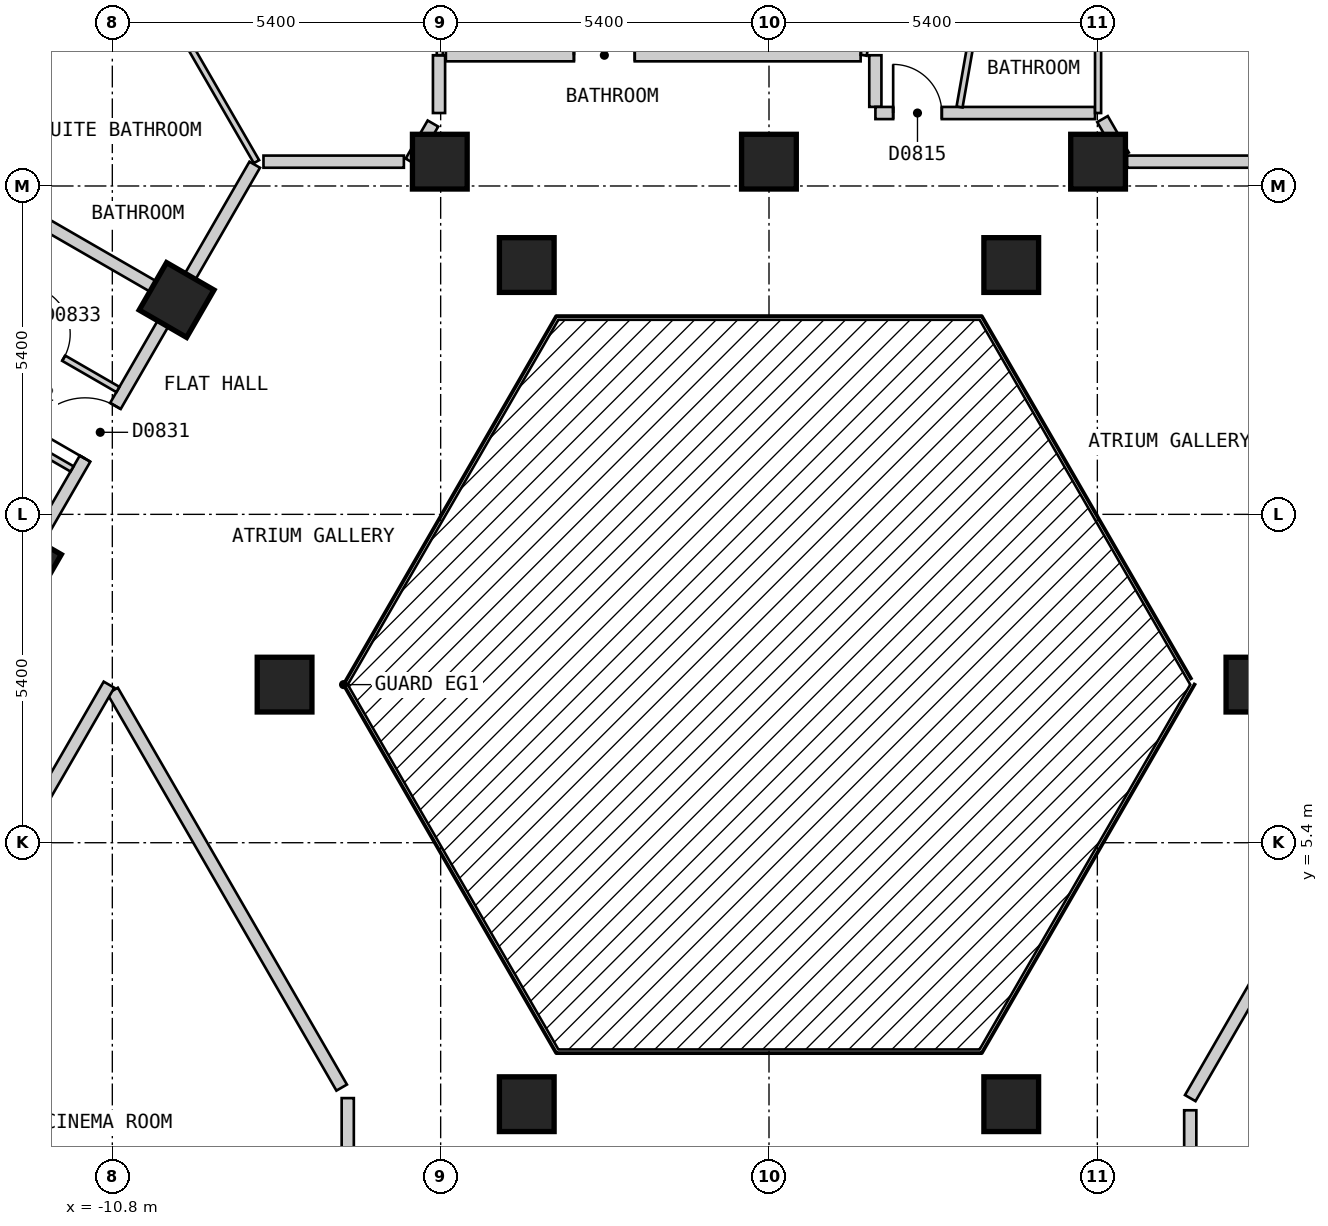
"""IFC4 building model, lengths in metres.
Left out: names, types, materials, properties, quantities, classifications, styles, units other than length and angle.
Written with IfcOpenShell. Run it as: python <this file> out.ifc"""

import sys

from ifc_helpers import new_model, si_unit, direction, frame, frame_2d, origin, origin_2d, place, context, subcontext, project, spatial, rectangle, extrude, element, fill, save


model = new_model("IFC4")
c1 = context("Model", 3, precision=1e-05, world=origin(), true_north=direction((0.0, 1.0)))
c2 = subcontext(c1, "Body", "Model", "MODEL_VIEW")
j1 = project(units=[si_unit("LENGTHUNIT", "METRE"), si_unit("PLANEANGLEUNIT", "RADIAN")], contexts=[c1])
p1 = place(None, origin())
s1 = spatial("IfcSite", under=j1, at=p1, CompositionType="ELEMENT")
p2 = place(p1, origin())
s2 = spatial("IfcBuilding", under=s1, at=p2, CompositionType="ELEMENT")
p3 = place(p2, frame((0.0, 0.0, 72.0)))
s3 = spatial("IfcBuildingStorey", under=s2, at=p3, CompositionType="ELEMENT", Elevation=72.0)
for number, where, z_axis, x_axis in (
    (1, (3.984, 1.1, 0.0), (0.0, 0.0, 1.0), (1.0, 0.0, 0.0)),
    (2, (7.967, 8.0, 0.0), (0.0, 0.0, 1.0), (1.0, 0.0, 0.0)),
    (3, (5.412, 16.6, 0.0), (0.0, 0.0, 1.0), (-1.0, 0.0, 0.0)),
    (4, (3.984, 14.9, 0.0), (0.0, 0.0, 1.0), (1.0, 0.0, 0.0)),
    (5, (-0.001, 16.6, 0.0), (0.0, 0.0, 1.0), (-1.0, 0.0, 0.0)),
    (6, (-3.984, 14.9, 0.0), (0.0, 0.0, 1.0), (1.0, 0.0, 0.0)),
    (7, (-5.414, 16.6, 0.0), (0.0, 0.0, 1.0), (-1.0, 0.0, 0.0)),
    (8, (-9.743, 14.325, 0.0), (0.0, 0.0, 1.0), (-0.5, -0.866, 0.0)),
    (9, (-7.967, 8.0, 0.0), (0.0, 0.0, 1.0), (1.0, 0.0, 0.0)),
    (10, (-12.254, 9.975, 0.0), (0.0, 0.0, 1.0), (-0.5, -0.866, 0.0)),
    (11, (-3.984, 1.1, 0.0), (0.0, 0.0, 1.0), (1.0, 0.0, 0.0)),
):
    element("IfcColumn", number, at=place(p3, frame(where, z_axis=z_axis, x_axis=x_axis)), inside=s3, PredefinedType="COLUMN", context=c2, shape_type="SweptSolid", body=[
        extrude(rectangle(XDim=0.9, YDim=0.9, at=origin_2d()), origin(), (0.0, 0.0, 1.0), 3.0),
    ])
p4 = place(p3, frame((-10.796, 7.899, 0.0), z_axis=(0.0, 0.0, 1.0), x_axis=(0.500010383074, -0.866019409031, 0.0)))
e12 = element("IfcWall", 12, at=p4, inside=s3, PredefinedType="PARTITIONING", context=c2, shape_type="SweptSolid", body=[
    extrude(rectangle(XDim=7.535, YDim=0.2, at=frame_2d((3.768, 0.0))), origin(), (0.0, 0.0, 1.0), 2.7),
])
p5 = place(p3, frame((5.485, 17.3, 0.0), z_axis=(0.0, 0.0, 1.0), x_axis=(0.499437640892, -0.866349838611, 0.0)))
e13 = element("IfcWall", 13, at=p5, inside=s3, PredefinedType="PARTITIONING", context=c2, shape_type="SweptSolid", body=[
    extrude(rectangle(XDim=0.693, YDim=0.2, at=frame_2d((0.346, 0.0))), origin(), (0.0, 0.0, 1.0), 2.7),
])
p6 = place(p3, frame((6.928, 1.0, 0.0), z_axis=(0.0, 0.0, 1.0), x_axis=(0.0, -1.0, 0.0)))
e14 = element("IfcWall", 14, at=p6, inside=s3, PredefinedType="PARTITIONING", context=c2, shape_type="SweptSolid", body=[
    extrude(rectangle(XDim=3.699, YDim=0.2, at=frame_2d((1.85, 0.0))), origin(), (0.0, 0.0, 1.0), 2.7),
])
p7 = place(p3, frame((1.749, 18.35, 0.0), z_axis=(0.0, 0.0, 1.0), x_axis=(0.0, -1.0, 0.0)))
e15 = element("IfcWall", 15, at=p7, inside=s3, PredefinedType="PARTITIONING", context=c2, shape_type="SweptSolid", body=[
    extrude(rectangle(XDim=0.849, YDim=0.2, at=frame_2d((0.425, 0.0))), origin(), (0.0, 0.0, 1.0), 2.7),
])
p8 = place(p3, frame((-8.314, 16.6, 0.0), z_axis=(0.0, 0.0, 1.0), x_axis=(1.0, 0.0, 0.0)))
e16 = element("IfcWall", 16, at=p8, inside=s3, PredefinedType="PARTITIONING", context=c2, shape_type="SweptSolid", body=[
    extrude(rectangle(XDim=2.309, YDim=0.2, at=frame_2d((1.155, 0.0))), origin(), (0.0, 0.0, 1.0), 2.7),
])
p9 = place(p3, frame((5.889, 16.6, 0.0), z_axis=(0.0, 0.0, 1.0), x_axis=(1.0, 0.0, 0.0)))
e17 = element("IfcWall", 17, at=p9, inside=s3, PredefinedType="PARTITIONING", context=c2, shape_type="SweptSolid", body=[
    extrude(rectangle(XDim=2.483, YDim=0.2, at=frame_2d((1.242, 0.0))), origin(), (0.0, 0.0, 1.0), 2.7),
])
p10 = place(p3, frame((1.75, 17.4, 0.0), z_axis=(0.0, 0.0, 1.0), x_axis=(1.0, 0.0, 0.0)))
e18 = element("IfcWall", 18, at=p10, inside=s3, PredefinedType="PARTITIONING", context=c2, shape_type="SweptSolid", body=[
    extrude(rectangle(XDim=3.612, YDim=0.2, at=frame_2d((1.806, 0.0))), origin(), (0.0, 0.0, 1.0), 2.7),
])
p11 = place(p10, frame((0.292, 0.0, 0.0)))
e19 = element("IfcOpeningElement", 19, at=p11, cuts=e18, PredefinedType="OPENING", context=c2, shape_type="SweptSolid", body=[
    extrude(rectangle(XDim=0.8, YDim=2.1, at=frame_2d((0.4, 1.05))), frame((0.0, 0.11, 0.0), z_axis=(0.0, -1.0, 0.0), x_axis=(1.0, 0.0, 0.0)), (0.0, 0.0, 1.0), 0.22),
])
p12 = place(p3, frame((-5.314, 18.35, 0.0), z_axis=(0.0, 0.0, 1.0), x_axis=(1.0, 0.0, 0.0)))
e20 = element("IfcWall", 20, at=p12, inside=s3, PredefinedType="PARTITIONING", context=c2, shape_type="SweptSolid", body=[
    extrude(rectangle(XDim=6.821, YDim=0.2, at=frame_2d((3.411, 0.0))), origin(), (0.0, 0.0, 1.0), 2.7),
])
p13 = place(p12, frame((2.106, 0.0, 0.0)))
e21 = element("IfcOpeningElement", 21, at=p13, cuts=e20, PredefinedType="OPENING", context=c2, shape_type="SweptSolid", body=[
    extrude(rectangle(XDim=1.0, YDim=2.1, at=frame_2d((0.5, 1.05))), frame((0.0, 0.11, 0.0), z_axis=(0.0, -1.0, 0.0), x_axis=(1.0, 0.0, 0.0)), (0.0, 0.0, 1.0), 0.22),
])
p14 = place(p3, frame((6.928, 1.2, 0.0), z_axis=(0.0, 0.0, 1.0), x_axis=(0.500055327065, 0.865993458332, 0.0)))
e22 = element("IfcWall", 22, at=p14, inside=s3, PredefinedType="PARTITIONING", context=c2, shape_type="SweptSolid", body=[
    extrude(rectangle(XDim=7.851, YDim=0.2, at=frame_2d((3.926, 0.0))), origin(), (0.0, 0.0, 1.0), 2.7),
])
p15 = place(p3, frame((-16.05, -1.0, 0.0), z_axis=(0.0, 0.0, 1.0), x_axis=(0.499962449088, 0.866047082728, 0.0)))
e23 = element("IfcWall", 23, at=p15, inside=s3, PredefinedType="PARTITIONING", context=c2, shape_type="SweptSolid", body=[
    extrude(rectangle(XDim=10.391, YDim=0.2, at=frame_2d((5.195, 0.0))), origin(), (0.0, 0.0, 1.0), 2.7),
])
p16 = place(p15, frame((4.745, 0.0, 0.0)))
e24 = element("IfcOpeningElement", 24, at=p16, cuts=e23, PredefinedType="OPENING", context=c2, shape_type="SweptSolid", body=[
    extrude(rectangle(XDim=0.9, YDim=2.1, at=frame_2d((0.45, 1.05))), frame((0.0, 0.11, 0.0), z_axis=(0.0, -1.0, 0.0), x_axis=(1.0, 0.0, 0.0)), (0.0, 0.0, 1.0), 0.22),
])
p17 = place(p3, frame((-5.889, 16.6, 0.0), z_axis=(0.0, 0.0, 1.0), x_axis=(0.499839240638, 0.866118198353, 0.0)))
e25 = element("IfcWall", 25, at=p17, inside=s3, PredefinedType="PARTITIONING", context=c2, shape_type="SweptSolid", body=[
    extrude(rectangle(XDim=0.724, YDim=0.2, at=frame_2d((0.362, 0.0))), origin(), (0.0, 0.0, 1.0), 2.7),
])
p18 = place(p3, frame((-18.562, -0.951, 0.0), z_axis=(0.0, 0.0, 1.0), x_axis=(0.499992962407, 0.866029466902, 0.0)))
e26 = element("IfcWall", 26, at=p18, inside=s3, PredefinedType="PARTITIONING", context=c2, shape_type="SweptSolid", body=[
    extrude(rectangle(XDim=20.208, YDim=0.2, at=frame_2d((10.104, 0.0))), origin(), (0.0, 0.0, 1.0), 2.7),
])
p19 = place(p18, frame((14.627, 0.0, 0.0)))
e27 = element("IfcOpeningElement", 27, at=p19, cuts=e26, PredefinedType="OPENING", context=c2, shape_type="SweptSolid", body=[
    extrude(rectangle(XDim=1.0, YDim=2.1, at=frame_2d((0.5, 1.05))), frame((0.0, 0.11, 0.0), z_axis=(0.0, -1.0, 0.0), x_axis=(1.0, 0.0, 0.0)), (0.0, 0.0, 1.0), 0.22),
])
p20 = place(p18, frame((4.581, 0.0, 0.0)))
e28 = element("IfcOpeningElement", 28, at=p20, cuts=e26, PredefinedType="OPENING", context=c2, shape_type="SweptSolid", body=[
    extrude(rectangle(XDim=1.0, YDim=2.1, at=frame_2d((0.5, 1.05))), frame((0.0, 0.11, 0.0), z_axis=(0.0, -1.0, 0.0), x_axis=(1.0, 0.0, 0.0)), (0.0, 0.0, 1.0), 0.22),
])
p21 = place(p3, frame((-5.427, 17.4, 0.0), z_axis=(0.0, 0.0, 1.0), x_axis=(0.0, 1.0, 0.0)))
e29 = element("IfcWall", 29, at=p21, inside=s3, PredefinedType="PARTITIONING", context=c2, shape_type="SweptSolid", body=[
    extrude(rectangle(XDim=0.95, YDim=0.2, at=frame_2d((0.475, 0.0))), origin(), (0.0, 0.0, 1.0), 2.7),
])
p22 = place(p3, frame((-6.928, -2.799, 0.0), z_axis=(0.0, 0.0, 1.0), x_axis=(0.0, 1.0, 0.0)))
e30 = element("IfcWall", 30, at=p22, inside=s3, PredefinedType="PARTITIONING", context=c2, shape_type="SweptSolid", body=[
    extrude(rectangle(XDim=3.999, YDim=0.2, at=frame_2d((2.0, 0.0))), origin(), (0.0, 0.0, 1.0), 2.7),
])
p23 = place(p3, frame((-10.742, 20.606, 0.0), z_axis=(0.0, 0.0, 1.0), x_axis=(0.50003312339, -0.866006279142, 0.0)))
e31 = element("IfcWall", 31, at=p23, inside=s3, PredefinedType="PARTITIONING", context=c2, shape_type="SweptSolid", body=[
    extrude(rectangle(XDim=4.626, YDim=0.1, at=frame_2d((2.313, 0.0))), origin(), (0.0, 0.0, 1.0), 2.7),
])
p24 = place(p3, frame((-13.981, 13.002, 0.0), z_axis=(0.0, 0.0, 1.0), x_axis=(0.86595634977, -0.500119585993, 0.0)))
e32 = element("IfcWall", 32, at=p24, inside=s3, PredefinedType="PARTITIONING", context=c2, shape_type="SweptSolid", body=[
    extrude(rectangle(XDim=2.909, YDim=0.1, at=frame_2d((1.455, 0.0))), origin(), (0.0, 0.0, 1.0), 2.7),
])
p25 = place(p24, frame((1.029, 0.0, 0.0)))
e33 = element("IfcOpeningElement", 33, at=p25, cuts=e32, PredefinedType="OPENING", context=c2, shape_type="SweptSolid", body=[
    extrude(rectangle(XDim=0.9, YDim=2.1, at=frame_2d((0.45, 1.05))), frame((0.0, 0.06, 0.0), z_axis=(0.0, -1.0, 0.0), x_axis=(1.0, 0.0, 0.0)), (0.0, 0.0, 1.0), 0.12),
])
p26 = place(p3, frame((-13.228, 14.308, 0.0), z_axis=(0.0, 0.0, 1.0), x_axis=(0.866003949776, -0.500037157592, 0.0)))
e34 = element("IfcWall", 34, at=p26, inside=s3, PredefinedType="PARTITIONING", context=c2, shape_type="SweptSolid", body=[
    extrude(rectangle(XDim=2.91, YDim=0.1, at=frame_2d((1.455, 0.0))), origin(), (0.0, 0.0, 1.0), 2.7),
])
p27 = place(p26, frame((1.08, 0.0, 0.0)))
e35 = element("IfcOpeningElement", 35, at=p27, cuts=e34, PredefinedType="OPENING", context=c2, shape_type="SweptSolid", body=[
    extrude(rectangle(XDim=0.8, YDim=2.1, at=frame_2d((0.4, 1.05))), frame((0.0, 0.06, 0.0), z_axis=(0.0, -1.0, 0.0), x_axis=(1.0, 0.0, 0.0)), (0.0, 0.0, 1.0), 0.12),
])
p28 = place(p3, frame((-13.328, 16.511, 0.0), z_axis=(0.0, 0.0, 1.0), x_axis=(0.518570528669, 0.855034857065, 0.0)))
e36 = element("IfcWall", 36, at=p28, inside=s3, PredefinedType="PARTITIONING", context=c2, shape_type="SweptSolid", body=[
    extrude(rectangle(XDim=4.83, YDim=0.1, at=frame_2d((2.415, 0.0))), origin(), (0.0, 0.0, 1.0), 2.7),
])
p29 = place(p28, frame((1.995, 0.0, 0.0)))
e37 = element("IfcOpeningElement", 37, at=p29, cuts=e36, PredefinedType="OPENING", context=c2, shape_type="SweptSolid", body=[
    extrude(rectangle(XDim=0.8, YDim=2.1, at=frame_2d((0.4, 1.05))), frame((0.0, 0.06, 0.0), z_axis=(0.0, -1.0, 0.0), x_axis=(1.0, 0.0, 0.0)), (0.0, 0.0, 1.0), 0.12),
])
p30 = place(p3, frame((3.134, 17.5, 0.0), z_axis=(0.0, 0.0, 1.0), x_axis=(0.172821216702, 0.984953210593, 0.0)))
e38 = element("IfcWall", 38, at=p30, inside=s3, PredefinedType="PARTITIONING", context=c2, shape_type="SweptSolid", body=[
    extrude(rectangle(XDim=4.97, YDim=0.1, at=frame_2d((2.485, 0.0))), origin(), (0.0, 0.0, 1.0), 2.7),
])
p31 = place(p30, frame((2.059, 0.0, 0.0)))
e39 = element("IfcOpeningElement", 39, at=p31, cuts=e38, PredefinedType="OPENING", context=c2, shape_type="SweptSolid", body=[
    extrude(rectangle(XDim=0.8, YDim=2.1, at=frame_2d((0.4, 1.05))), frame((0.0, 0.06, 0.0), z_axis=(0.0, -1.0, 0.0), x_axis=(1.0, 0.0, 0.0)), (0.0, 0.0, 1.0), 0.12),
])
p32 = place(p3, frame((1.557, 18.35, 0.0), z_axis=(0.0, 0.0, 1.0), x_axis=(0.173062973099, 0.984910761106, 0.0)))
e40 = element("IfcWall", 40, at=p32, inside=s3, PredefinedType="PARTITIONING", context=c2, shape_type="SweptSolid", body=[
    extrude(rectangle(XDim=4.242, YDim=0.1, at=frame_2d((2.121, 0.0))), origin(), (0.0, 0.0, 1.0), 2.7),
])
p33 = place(p32, frame((1.671, 0.0, 0.0)))
e41 = element("IfcOpeningElement", 41, at=p33, cuts=e40, PredefinedType="OPENING", context=c2, shape_type="SweptSolid", body=[
    extrude(rectangle(XDim=0.9, YDim=2.1, at=frame_2d((0.45, 1.05))), frame((0.0, 0.06, 0.0), z_axis=(0.0, -1.0, 0.0), x_axis=(1.0, 0.0, 0.0)), (0.0, 0.0, 1.0), 0.12),
])
p34 = place(p3, frame((5.412, 17.4, 0.0), z_axis=(0.0, 0.0, 1.0), x_axis=(0.0, 1.0, 0.0)))
e42 = element("IfcWall", 42, at=p34, inside=s3, PredefinedType="PARTITIONING", context=c2, shape_type="SweptSolid", body=[
    extrude(rectangle(XDim=4.925, YDim=0.1, at=frame_2d((2.462, 0.0))), origin(), (0.0, 0.0, 1.0), 2.7),
])
p35 = place(p3, frame((-5.414, 18.35, 0.0), z_axis=(0.0, 0.0, 1.0), x_axis=(0.0, 1.0, 0.0)))
e43 = element("IfcWall", 43, at=p35, inside=s3, PredefinedType="PARTITIONING", context=c2, shape_type="SweptSolid", body=[
    extrude(rectangle(XDim=4.15, YDim=0.1, at=frame_2d((2.075, 0.0))), origin(), (0.0, 0.0, 1.0), 2.7),
])
p36 = place(p3, frame((-18.489, 19.375, 0.0), z_axis=(0.0, 0.0, 1.0), x_axis=(0.866016855193, -0.500014806302, 0.0)))
e44 = element("IfcWall", 44, at=p36, inside=s3, PredefinedType="PARTITIONING", context=c2, shape_type="SweptSolid", body=[
    extrude(rectangle(XDim=10.0, YDim=0.2, at=frame_2d((5.0, 0.0))), origin(), (0.0, 0.0, 1.0), 2.7),
])
p37 = place(p11, origin())
e45 = element("IfcDoor", 45, at=p37, inside=s3, OperationType="SINGLE_SWING_LEFT", PredefinedType="DOOR", context=c2, shape_type="SweptSolid", body=[
    extrude(rectangle(XDim=0.8, YDim=2.1, at=frame_2d((0.4, 1.05))), frame((0.0, 0.025, 0.0), z_axis=(0.0, -1.0, 0.0), x_axis=(1.0, 0.0, 0.0)), (0.0, 0.0, 1.0), 0.05),
])
fill(e19, e45)
p38 = place(p13, origin())
e46 = element("IfcDoor", 46, at=p38, inside=s3, OperationType="SINGLE_SWING_LEFT", PredefinedType="DOOR", context=c2, shape_type="SweptSolid", body=[
    extrude(rectangle(XDim=1.0, YDim=2.1, at=frame_2d((0.5, 1.05))), frame((0.0, 0.025, 0.0), z_axis=(0.0, -1.0, 0.0), x_axis=(1.0, 0.0, 0.0)), (0.0, 0.0, 1.0), 0.05),
])
fill(e21, e46)
p39 = place(p19, origin())
e47 = element("IfcDoor", 47, at=p39, inside=s3, OperationType="SINGLE_SWING_LEFT", PredefinedType="DOOR", context=c2, shape_type="SweptSolid", body=[
    extrude(rectangle(XDim=1.0, YDim=2.1, at=frame_2d((0.5, 1.05))), frame((0.0, 0.025, 0.0), z_axis=(0.0, -1.0, 0.0), x_axis=(1.0, 0.0, 0.0)), (0.0, 0.0, 1.0), 0.05),
])
fill(e27, e47)
p40 = place(p27, origin())
e48 = element("IfcDoor", 48, at=p40, inside=s3, OperationType="SINGLE_SWING_LEFT", PredefinedType="DOOR", context=c2, shape_type="SweptSolid", body=[
    extrude(rectangle(XDim=0.8, YDim=2.1, at=frame_2d((0.4, 1.05))), frame((0.0, 0.025, 0.0), z_axis=(0.0, -1.0, 0.0), x_axis=(1.0, 0.0, 0.0)), (0.0, 0.0, 1.0), 0.05),
])
fill(e35, e48)
save(model, sys.argv[1])
